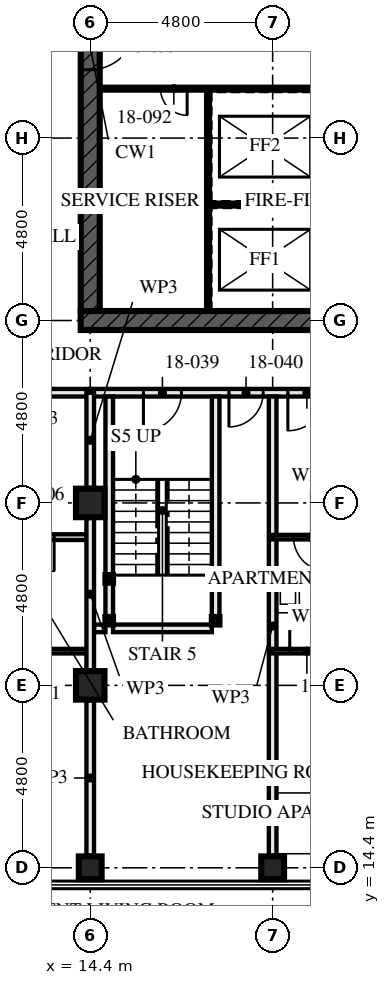
"""IFC4 building model, lengths in metres.
Left out: names, types, materials, properties, quantities, classifications, styles, units other than length and angle.
Written with IfcOpenShell. Run it as: python <this file> out.ifc"""

import sys

from ifc_helpers import new_model, si_unit, direction, frame, frame_2d, origin, origin_2d, place, context, subcontext, project, spatial, rectangle, hollow_rectangle, extrude, element, fill, save


model = new_model("IFC4")
c1 = context("Model", 3, precision=1e-05, world=origin(), true_north=direction((0.0, 1.0)))
c2 = subcontext(c1, "Body", "Model", "MODEL_VIEW")
j1 = project(units=[si_unit("LENGTHUNIT", "METRE"), si_unit("PLANEANGLEUNIT", "RADIAN")], contexts=[c1])
p1 = place(None, origin())
s1 = spatial("IfcSite", under=j1, at=p1, CompositionType="ELEMENT")
p2 = place(p1, origin())
s2 = spatial("IfcBuilding", under=s1, at=p2, CompositionType="ELEMENT")
p3 = place(p2, frame((0.0, 0.0, 69.0)))
s3 = spatial("IfcBuildingStorey", under=s2, at=p3, CompositionType="ELEMENT", Elevation=69.0)
p4 = place(p3, frame((14.4, 14.4, 0.0), z_axis=(0.0, 0.0, 1.0), x_axis=(0.0, 1.0, 0.0)))
e1 = element("IfcColumn", 1, at=p4, inside=s3, PredefinedType="COLUMN", context=c2, shape_type="SweptSolid", body=[
    extrude(hollow_rectangle(XDim=0.6, YDim=0.6, WallThickness=0.08, at=origin_2d()), origin(), (0.0, 0.0, 1.0), 3.5),
])
for number, where, z_axis, x_axis in (
    (2, (14.4, 19.2, 0.0), (0.0, 0.0, 1.0), (1.0, 0.0, 0.0)),
    (3, (14.4, 24.0, 0.0), (0.0, 0.0, 1.0), (1.0, 0.0, 0.0)),
):
    element("IfcColumn", number, at=place(p3, frame(where, z_axis=z_axis, x_axis=x_axis)), inside=s3, PredefinedType="COLUMN", context=c2, shape_type="SweptSolid", body=[
        extrude(hollow_rectangle(XDim=0.75, YDim=0.75, WallThickness=0.08, at=origin_2d()), origin(), (0.0, 0.0, 1.0), 3.5),
    ])
p5 = place(p3, frame((19.2, 14.4, 0.0), z_axis=(0.0, 0.0, 1.0), x_axis=(0.0, 1.0, 0.0)))
e4 = element("IfcColumn", 4, at=p5, inside=s3, PredefinedType="COLUMN", context=c2, shape_type="SweptSolid", body=[
    extrude(hollow_rectangle(XDim=0.6, YDim=0.6, WallThickness=0.08, at=origin_2d()), origin(), (0.0, 0.0, 1.0), 3.5),
])
p6 = place(p3, frame((14.15, 28.8, -0.17), z_axis=(0.0, 0.0, 1.0), x_axis=(1.0, 0.0, 0.0)))
e5 = element("IfcWall", 5, at=p6, inside=s3, PredefinedType="SHEAR", context=c2, shape_type="SweptSolid", body=[
    extrude(rectangle(XDim=14.9, YDim=0.5, at=frame_2d((7.45, 0.0))), origin(), (0.0, 0.0, 1.0), 3.5),
])
p7 = place(p6, frame((6.85, 0.0, 0.17)))
e6 = element("IfcOpeningElement", 6, at=p7, cuts=e5, PredefinedType="OPENING", context=c2, shape_type="SweptSolid", body=[
    extrude(rectangle(XDim=1.2, YDim=2.1, at=frame_2d((0.6, 1.05))), frame((0.0, 0.26, 0.0), z_axis=(0.0, -1.0, 0.0), x_axis=(1.0, 0.0, 0.0)), (0.0, 0.0, 1.0), 0.521),
])
p8 = place(p3, frame((14.4, 42.95, -0.17), z_axis=(0.0, 0.0, 1.0), x_axis=(0.0, -1.0, 0.0)))
e7 = element("IfcWall", 7, at=p8, inside=s3, PredefinedType="SHEAR", context=c2, shape_type="SweptSolid", body=[
    extrude(rectangle(XDim=13.9, YDim=0.5, at=frame_2d((6.95, 0.0))), origin(), (0.0, 0.0, 1.0), 3.5),
])
p9 = place(p8, frame((6.35, 0.0, 0.17)))
e8 = element("IfcOpeningElement", 8, at=p9, cuts=e7, PredefinedType="OPENING", context=c2, shape_type="SweptSolid", body=[
    extrude(rectangle(XDim=1.2, YDim=2.1, at=frame_2d((0.6, 1.05))), frame((0.0, 0.26, 0.0), z_axis=(0.0, -1.0, 0.0), x_axis=(1.0, 0.0, 0.0)), (0.0, 0.0, 1.0), 0.521),
])
for number, where, z_axis, x_axis in (
    (9, (14.9, 20.9, 0.0), (0.0, 0.0, 1.0), (1.0, 0.0, 0.0)),
    (10, (17.7, 20.9, 0.0), (0.0, 0.0, 1.0), (1.0, 0.0, 0.0)),
    (11, (14.9, 22.0, 0.0), (0.0, 0.0, 1.0), (1.0, 0.0, 0.0)),
    (12, (17.7, 22.0, 0.0), (0.0, 0.0, 1.0), (1.0, 0.0, 0.0)),
):
    element("IfcColumn", number, at=place(p3, frame(where, z_axis=z_axis, x_axis=x_axis)), inside=s3, PredefinedType="COLUMN", context=c2, shape_type="SweptSolid", body=[
        extrude(hollow_rectangle(XDim=0.2, YDim=0.2, WallThickness=0.008, at=origin_2d()), origin(), (0.0, 0.0, 1.0), 3.33),
    ])
p10 = place(p3, frame((11.6, 23.1, 0.0), z_axis=(0.0, 0.0, 1.0), x_axis=(1.0, 0.0, 0.0)))
e13 = element("IfcWall", 13, at=p10, inside=s3, PredefinedType="PARTITIONING", context=c2, shape_type="SweptSolid", body=[
    extrude(rectangle(XDim=2.8, YDim=0.15, at=frame_2d((1.4, 0.0))), origin(), (0.0, 0.0, 1.0), 3.33),
])
p11 = place(p10, frame((0.95, 0.0, 0.0)))
e14 = element("IfcOpeningElement", 14, at=p11, cuts=e13, PredefinedType="OPENING", context=c2, shape_type="SweptSolid", body=[
    extrude(rectangle(XDim=0.9, YDim=2.1, at=frame_2d((0.45, 1.05))), frame((0.0, 0.085, 0.0), z_axis=(0.0, -1.0, 0.0), x_axis=(1.0, 0.0, 0.0)), (0.0, 0.0, 1.0), 0.171),
])
p12 = place(p3, frame((9.6, 20.1, 0.0), z_axis=(0.0, 0.0, 1.0), x_axis=(1.0, 0.0, 0.0)))
e15 = element("IfcWall", 15, at=p12, inside=s3, PredefinedType="PARTITIONING", context=c2, shape_type="SweptSolid", body=[
    extrude(rectangle(XDim=4.8, YDim=0.12, at=frame_2d((2.4, 0.0))), origin(), (0.0, 0.0, 1.0), 3.33),
])
p13 = place(p12, frame((0.45, 0.0, 0.0)))
e16 = element("IfcOpeningElement", 16, at=p13, cuts=e15, PredefinedType="OPENING", context=c2, shape_type="SweptSolid", body=[
    extrude(rectangle(XDim=0.9, YDim=2.1, at=frame_2d((0.45, 1.05))), frame((0.0, 0.071, 0.0), z_axis=(0.0, -1.0, 0.0), x_axis=(1.0, 0.0, 0.0)), (0.0, 0.0, 1.0), 0.141),
])
p14 = place(p3, frame((4.8, 26.9, 0.0), z_axis=(0.0, 0.0, 1.0), x_axis=(1.0, 0.0, 0.0)))
e17 = element("IfcWall", 17, at=p14, inside=s3, PredefinedType="PARTITIONING", context=c2, shape_type="SweptSolid", body=[
    extrude(rectangle(XDim=9.6, YDim=0.2, at=frame_2d((4.8, 0.0))), origin(), (0.0, 0.0, 1.0), 3.33),
])
p15 = place(p14, frame((0.4, 0.0, 0.0)))
e18 = element("IfcOpeningElement", 18, at=p15, cuts=e17, PredefinedType="OPENING", context=c2, shape_type="SweptSolid", body=[
    extrude(rectangle(XDim=1.0, YDim=2.1, at=frame_2d((0.5, 1.05))), frame((0.0, 0.111, 0.0), z_axis=(0.0, -1.0, 0.0), x_axis=(1.0, 0.0, 0.0)), (0.0, 0.0, 1.0), 0.221),
])
p16 = place(p14, frame((5.2, 0.0, 0.0)))
e19 = element("IfcOpeningElement", 19, at=p16, cuts=e17, PredefinedType="OPENING", context=c2, shape_type="SweptSolid", body=[
    extrude(rectangle(XDim=1.0, YDim=2.1, at=frame_2d((0.5, 1.05))), frame((0.0, 0.111, 0.0), z_axis=(0.0, -1.0, 0.0), x_axis=(1.0, 0.0, 0.0)), (0.0, 0.0, 1.0), 0.221),
])
p17 = place(p3, frame((14.9, 21.0, 0.0), z_axis=(0.0, 0.0, 1.0), x_axis=(0.0, 1.0, 0.0)))
e20 = element("IfcWall", 20, at=p17, inside=s3, PredefinedType="SOLIDWALL", context=c2, shape_type="SweptSolid", body=[
    extrude(rectangle(XDim=0.9, YDim=0.2, at=frame_2d((0.45, 0.0))), origin(), (0.0, 0.0, 1.0), 2.99),
])
p18 = place(p3, frame((14.9, 22.1, 0.0), z_axis=(0.0, 0.0, 1.0), x_axis=(0.0, 1.0, 0.0)))
e21 = element("IfcWall", 21, at=p18, inside=s3, PredefinedType="SOLIDWALL", context=c2, shape_type="SweptSolid", body=[
    extrude(rectangle(XDim=4.7, YDim=0.2, at=frame_2d((2.35, 0.0))), origin(), (0.0, 0.0, 1.0), 2.99),
])
p19 = place(p3, frame((17.7, 21.0, 0.0), z_axis=(0.0, 0.0, 1.0), x_axis=(0.0, 1.0, 0.0)))
e22 = element("IfcWall", 22, at=p19, inside=s3, PredefinedType="SOLIDWALL", context=c2, shape_type="SweptSolid", body=[
    extrude(rectangle(XDim=0.9, YDim=0.2, at=frame_2d((0.45, 0.0))), origin(), (0.0, 0.0, 1.0), 2.99),
])
p20 = place(p3, frame((17.7, 22.1, 0.0), z_axis=(0.0, 0.0, 1.0), x_axis=(0.0, 1.0, 0.0)))
e23 = element("IfcWall", 23, at=p20, inside=s3, PredefinedType="SOLIDWALL", context=c2, shape_type="SweptSolid", body=[
    extrude(rectangle(XDim=4.7, YDim=0.2, at=frame_2d((2.35, 0.0))), origin(), (0.0, 0.0, 1.0), 2.99),
])
p21 = place(p3, frame((14.5, 20.7, 0.0), z_axis=(0.0, 0.0, 1.0), x_axis=(1.0, 0.0, 0.0)))
e24 = element("IfcWall", 24, at=p21, inside=s3, PredefinedType="SOLIDWALL", context=c2, shape_type="SweptSolid", body=[
    extrude(rectangle(XDim=0.3, YDim=0.2, at=frame_2d((0.15, 0.0))), origin(), (0.0, 0.0, 1.0), 3.33),
])
p22 = place(p3, frame((15.0, 20.7, 0.0), z_axis=(0.0, 0.0, 1.0), x_axis=(1.0, 0.0, 0.0)))
e25 = element("IfcWall", 25, at=p22, inside=s3, PredefinedType="SOLIDWALL", context=c2, shape_type="SweptSolid", body=[
    extrude(rectangle(XDim=2.6, YDim=0.2, at=frame_2d((1.3, 0.0))), origin(), (0.0, 0.0, 1.0), 3.33),
])
p23 = place(p3, frame((19.2, 14.72, 0.0), z_axis=(0.0, 0.0, 1.0), x_axis=(0.0, 1.0, 0.0)))
e26 = element("IfcWall", 26, at=p23, inside=s3, PredefinedType="PARTITIONING", context=c2, shape_type="SweptSolid", body=[
    extrude(rectangle(XDim=12.08, YDim=0.2, at=frame_2d((6.04, 0.0))), origin(), (0.0, 0.0, 1.0), 2.55),
])
p24 = place(p3, frame((19.2, 23.1, 0.0), z_axis=(0.0, 0.0, 1.0), x_axis=(1.0, 0.0, 0.0)))
e27 = element("IfcWall", 27, at=p24, inside=s3, PredefinedType="PARTITIONING", context=c2, shape_type="SweptSolid", body=[
    extrude(rectangle(XDim=2.0, YDim=0.12, at=frame_2d((1.0, 0.0))), origin(), (0.0, 0.0, 1.0), 3.33),
])
p25 = place(p24, frame((0.55, 0.0, 0.0)))
e28 = element("IfcOpeningElement", 28, at=p25, cuts=e27, PredefinedType="OPENING", context=c2, shape_type="SweptSolid", body=[
    extrude(rectangle(XDim=0.9, YDim=2.1, at=frame_2d((0.45, 1.05))), frame((0.0, 0.071, 0.0), z_axis=(0.0, -1.0, 0.0), x_axis=(1.0, 0.0, 0.0)), (0.0, 0.0, 1.0), 0.141),
])
p26 = place(p3, frame((19.2, 20.1, 0.0), z_axis=(0.0, 0.0, 1.0), x_axis=(1.0, 0.0, 0.0)))
e29 = element("IfcWall", 29, at=p26, inside=s3, PredefinedType="PARTITIONING", context=c2, shape_type="SweptSolid", body=[
    extrude(rectangle(XDim=4.8, YDim=0.12, at=frame_2d((2.4, 0.0))), origin(), (0.0, 0.0, 1.0), 3.33),
])
p27 = place(p26, frame((0.45, 0.0, 0.0)))
e30 = element("IfcOpeningElement", 30, at=p27, cuts=e29, PredefinedType="OPENING", context=c2, shape_type="SweptSolid", body=[
    extrude(rectangle(XDim=0.9, YDim=2.1, at=frame_2d((0.45, 1.05))), frame((0.0, 0.071, 0.0), z_axis=(0.0, -1.0, 0.0), x_axis=(1.0, 0.0, 0.0)), (0.0, 0.0, 1.0), 0.141),
])
p28 = place(p3, frame((14.4, 26.9, 0.0), z_axis=(0.0, 0.0, 1.0), x_axis=(1.0, 0.0, 0.0)))
e31 = element("IfcWall", 31, at=p28, inside=s3, PredefinedType="PARTITIONING", context=c2, shape_type="SweptSolid", body=[
    extrude(rectangle(XDim=14.4, YDim=0.2, at=frame_2d((7.2, 0.0))), origin(), (0.0, 0.0, 1.0), 2.55),
])
p29 = place(p28, frame((1.4, 0.0, 0.0)))
e32 = element("IfcOpeningElement", 32, at=p29, cuts=e31, PredefinedType="OPENING", context=c2, shape_type="SweptSolid", body=[
    extrude(rectangle(XDim=1.0, YDim=2.1, at=frame_2d((0.5, 1.05))), frame((0.0, 0.111, 0.0), z_axis=(0.0, -1.0, 0.0), x_axis=(1.0, 0.0, 0.0)), (0.0, 0.0, 1.0), 0.221),
])
p30 = place(p28, frame((3.65, 0.0, 0.0)))
e33 = element("IfcOpeningElement", 33, at=p30, cuts=e31, PredefinedType="OPENING", context=c2, shape_type="SweptSolid", body=[
    extrude(rectangle(XDim=0.9, YDim=2.1, at=frame_2d((0.45, 1.05))), frame((0.0, 0.111, 0.0), z_axis=(0.0, -1.0, 0.0), x_axis=(1.0, 0.0, 0.0)), (0.0, 0.0, 1.0), 0.221),
])
p31 = place(p28, frame((5.2, 0.0, 0.0)))
e34 = element("IfcOpeningElement", 34, at=p31, cuts=e31, PredefinedType="OPENING", context=c2, shape_type="SweptSolid", body=[
    extrude(rectangle(XDim=1.0, YDim=2.1, at=frame_2d((0.5, 1.05))), frame((0.0, 0.111, 0.0), z_axis=(0.0, -1.0, 0.0), x_axis=(1.0, 0.0, 0.0)), (0.0, 0.0, 1.0), 0.221),
])
p32 = place(p28, frame((10.0, 0.0, 0.0)))
e35 = element("IfcOpeningElement", 35, at=p32, cuts=e31, PredefinedType="OPENING", context=c2, shape_type="SweptSolid", body=[
    extrude(rectangle(XDim=1.0, YDim=2.1, at=frame_2d((0.5, 1.05))), frame((0.0, 0.111, 0.0), z_axis=(0.0, -1.0, 0.0), x_axis=(1.0, 0.0, 0.0)), (0.0, 0.0, 1.0), 0.221),
])
p33 = place(p3, frame((14.65, 34.9, 0.0), z_axis=(0.0, 0.0, 1.0), x_axis=(1.0, 0.0, 0.0)))
e36 = element("IfcWall", 36, at=p33, inside=s3, PredefinedType="SOLIDWALL", context=c2, shape_type="SweptSolid", body=[
    extrude(rectangle(XDim=5.9, YDim=0.1, at=frame_2d((2.95, 0.0))), origin(), (0.0, 0.0, 1.0), 3.33),
])
p34 = place(p33, frame((1.6, 0.0, 0.0)))
e37 = element("IfcOpeningElement", 37, at=p34, cuts=e36, PredefinedType="OPENING", context=c2, shape_type="SweptSolid", body=[
    extrude(rectangle(XDim=0.7, YDim=2.1, at=frame_2d((0.35, 1.05))), frame((0.0, 0.061, 0.0), z_axis=(0.0, -1.0, 0.0), x_axis=(1.0, 0.0, 0.0)), (0.0, 0.0, 1.0), 0.121),
])
p35 = place(p3, frame((17.5, 29.05, 0.0), z_axis=(0.0, 0.0, 1.0), x_axis=(0.0, 1.0, 0.0)))
e38 = element("IfcWall", 38, at=p35, inside=s3, PredefinedType="SOLIDWALL", context=c2, shape_type="SweptSolid", body=[
    extrude(rectangle(XDim=5.8, YDim=0.1, at=frame_2d((2.9, 0.0))), origin(), (0.0, 0.0, 1.0), 3.33),
])
p36 = place(p3, frame((17.55, 31.85, 0.0), z_axis=(0.0, 0.0, 1.0), x_axis=(1.0, 0.0, 0.0)))
e39 = element("IfcWall", 39, at=p36, inside=s3, PredefinedType="SOLIDWALL", context=c2, shape_type="SweptSolid", body=[
    extrude(rectangle(XDim=2.9, YDim=0.1, at=frame_2d((1.45, 0.0))), origin(), (0.0, 0.0, 1.0), 3.33),
])
p37 = place(p3, frame((14.4, 14.72, 0.0), z_axis=(0.0, 0.0, 1.0), x_axis=(0.0, 1.0, 0.0)))
e40 = element("IfcWall", 40, at=p37, inside=s3, PredefinedType="PARTITIONING", context=c2, shape_type="SweptSolid", body=[
    extrude(rectangle(XDim=4.085, YDim=0.2, at=frame_2d((2.042, 0.0))), origin(), (0.0, 0.0, 1.0), 2.32),
])
p38 = place(p3, frame((14.4, 19.595, 0.0), z_axis=(0.0, 0.0, 1.0), x_axis=(0.0, 1.0, 0.0)))
e41 = element("IfcWall", 41, at=p38, inside=s3, PredefinedType="PARTITIONING", context=c2, shape_type="SweptSolid", body=[
    extrude(rectangle(XDim=4.01, YDim=0.2, at=frame_2d((2.005, 0.0))), origin(), (0.0, 0.0, 1.0), 2.32),
])
p39 = place(p3, frame((14.4, 24.395, 0.0), z_axis=(0.0, 0.0, 1.0), x_axis=(0.0, 1.0, 0.0)))
e42 = element("IfcWall", 42, at=p39, inside=s3, PredefinedType="PARTITIONING", context=c2, shape_type="SweptSolid", body=[
    extrude(rectangle(XDim=2.505, YDim=0.2, at=frame_2d((1.252, 0.0))), origin(), (0.0, 0.0, 1.0), 2.32),
])
p40 = place(p11, frame((0.9, 0.0, 0.0), z_axis=(0.0, 0.0, 1.0), x_axis=(-1.0, 0.0, 0.0)))
e43 = element("IfcDoor", 43, at=p40, inside=s3, OperationType="SINGLE_SWING_RIGHT", PredefinedType="DOOR", context=c2, shape_type="SweptSolid", body=[
    extrude(rectangle(XDim=0.9, YDim=2.1, at=frame_2d((0.45, 1.05))), frame((0.0, 0.022, 0.0), z_axis=(0.0, -1.0, 0.0), x_axis=(1.0, 0.0, 0.0)), (0.0, 0.0, 1.0), 0.044),
])
fill(e14, e43)
p41 = place(p25, frame((0.9, 0.0, 0.0), z_axis=(0.0, 0.0, 1.0), x_axis=(-1.0, 0.0, 0.0)))
e44 = element("IfcDoor", 44, at=p41, inside=s3, OperationType="SINGLE_SWING_RIGHT", PredefinedType="DOOR", context=c2, shape_type="SweptSolid", body=[
    extrude(rectangle(XDim=0.9, YDim=2.1, at=frame_2d((0.45, 1.05))), frame((0.0, 0.022, 0.0), z_axis=(0.0, -1.0, 0.0), x_axis=(1.0, 0.0, 0.0)), (0.0, 0.0, 1.0), 0.044),
])
fill(e28, e44)
p42 = place(p27, origin())
e45 = element("IfcDoor", 45, at=p42, inside=s3, OperationType="SINGLE_SWING_RIGHT", PredefinedType="DOOR", context=c2, shape_type="SweptSolid", body=[
    extrude(rectangle(XDim=0.9, YDim=2.1, at=frame_2d((0.45, 1.05))), frame((0.0, 0.022, 0.0), z_axis=(0.0, -1.0, 0.0), x_axis=(1.0, 0.0, 0.0)), (0.0, 0.0, 1.0), 0.044),
])
fill(e30, e45)
p43 = place(p29, frame((1.0, 0.0, 0.0), z_axis=(0.0, 0.0, 1.0), x_axis=(-1.0, 0.0, 0.0)))
e46 = element("IfcDoor", 46, at=p43, inside=s3, OperationType="SINGLE_SWING_LEFT", PredefinedType="DOOR", context=c2, shape_type="SweptSolid", body=[
    extrude(rectangle(XDim=1.0, YDim=2.1, at=frame_2d((0.5, 1.05))), frame((0.0, 0.032, 0.0), z_axis=(0.0, -1.0, 0.0), x_axis=(1.0, 0.0, 0.0)), (0.0, 0.0, 1.0), 0.064),
])
fill(e32, e46)
p44 = place(p30, frame((0.9, 0.0, 0.0), z_axis=(0.0, 0.0, 1.0), x_axis=(-1.0, 0.0, 0.0)))
e47 = element("IfcDoor", 47, at=p44, inside=s3, OperationType="SINGLE_SWING_LEFT", PredefinedType="DOOR", context=c2, shape_type="SweptSolid", body=[
    extrude(rectangle(XDim=0.9, YDim=2.1, at=frame_2d((0.45, 1.05))), frame((0.0, 0.027, 0.0), z_axis=(0.0, -1.0, 0.0), x_axis=(1.0, 0.0, 0.0)), (0.0, 0.0, 1.0), 0.054),
])
fill(e33, e47)
p45 = place(p31, frame((1.0, 0.0, 0.0), z_axis=(0.0, 0.0, 1.0), x_axis=(-1.0, 0.0, 0.0)))
e48 = element("IfcDoor", 48, at=p45, inside=s3, OperationType="SINGLE_SWING_LEFT", PredefinedType="DOOR", context=c2, shape_type="SweptSolid", body=[
    extrude(rectangle(XDim=1.0, YDim=2.1, at=frame_2d((0.5, 1.05))), frame((0.0, 0.027, 0.0), z_axis=(0.0, -1.0, 0.0), x_axis=(1.0, 0.0, 0.0)), (0.0, 0.0, 1.0), 0.054),
])
fill(e34, e48)
p46 = place(p34, frame((0.7, 0.0, 0.0), z_axis=(0.0, 0.0, 1.0), x_axis=(-1.0, 0.0, 0.0)))
e49 = element("IfcDoor", 49, at=p46, inside=s3, OperationType="SINGLE_SWING_RIGHT", PredefinedType="DOOR", context=c2, shape_type="SweptSolid", body=[
    extrude(rectangle(XDim=0.7, YDim=2.1, at=frame_2d((0.35, 1.05))), frame((0.0, 0.027, 0.0), z_axis=(0.0, -1.0, 0.0), x_axis=(1.0, 0.0, 0.0)), (0.0, 0.0, 1.0), 0.054),
])
fill(e37, e49)
p47 = place(p9, origin())
e50 = element("IfcDoor", 50, at=p47, inside=s3, OperationType="SINGLE_SWING_LEFT", PredefinedType="DOOR", context=c2, shape_type="SweptSolid", body=[
    extrude(rectangle(XDim=1.2, YDim=2.1, at=frame_2d((0.6, 1.05))), frame((0.0, 0.027, 0.0), z_axis=(0.0, -1.0, 0.0), x_axis=(1.0, 0.0, 0.0)), (0.0, 0.0, 1.0), 0.054),
])
fill(e8, e50)
save(model, sys.argv[1])
